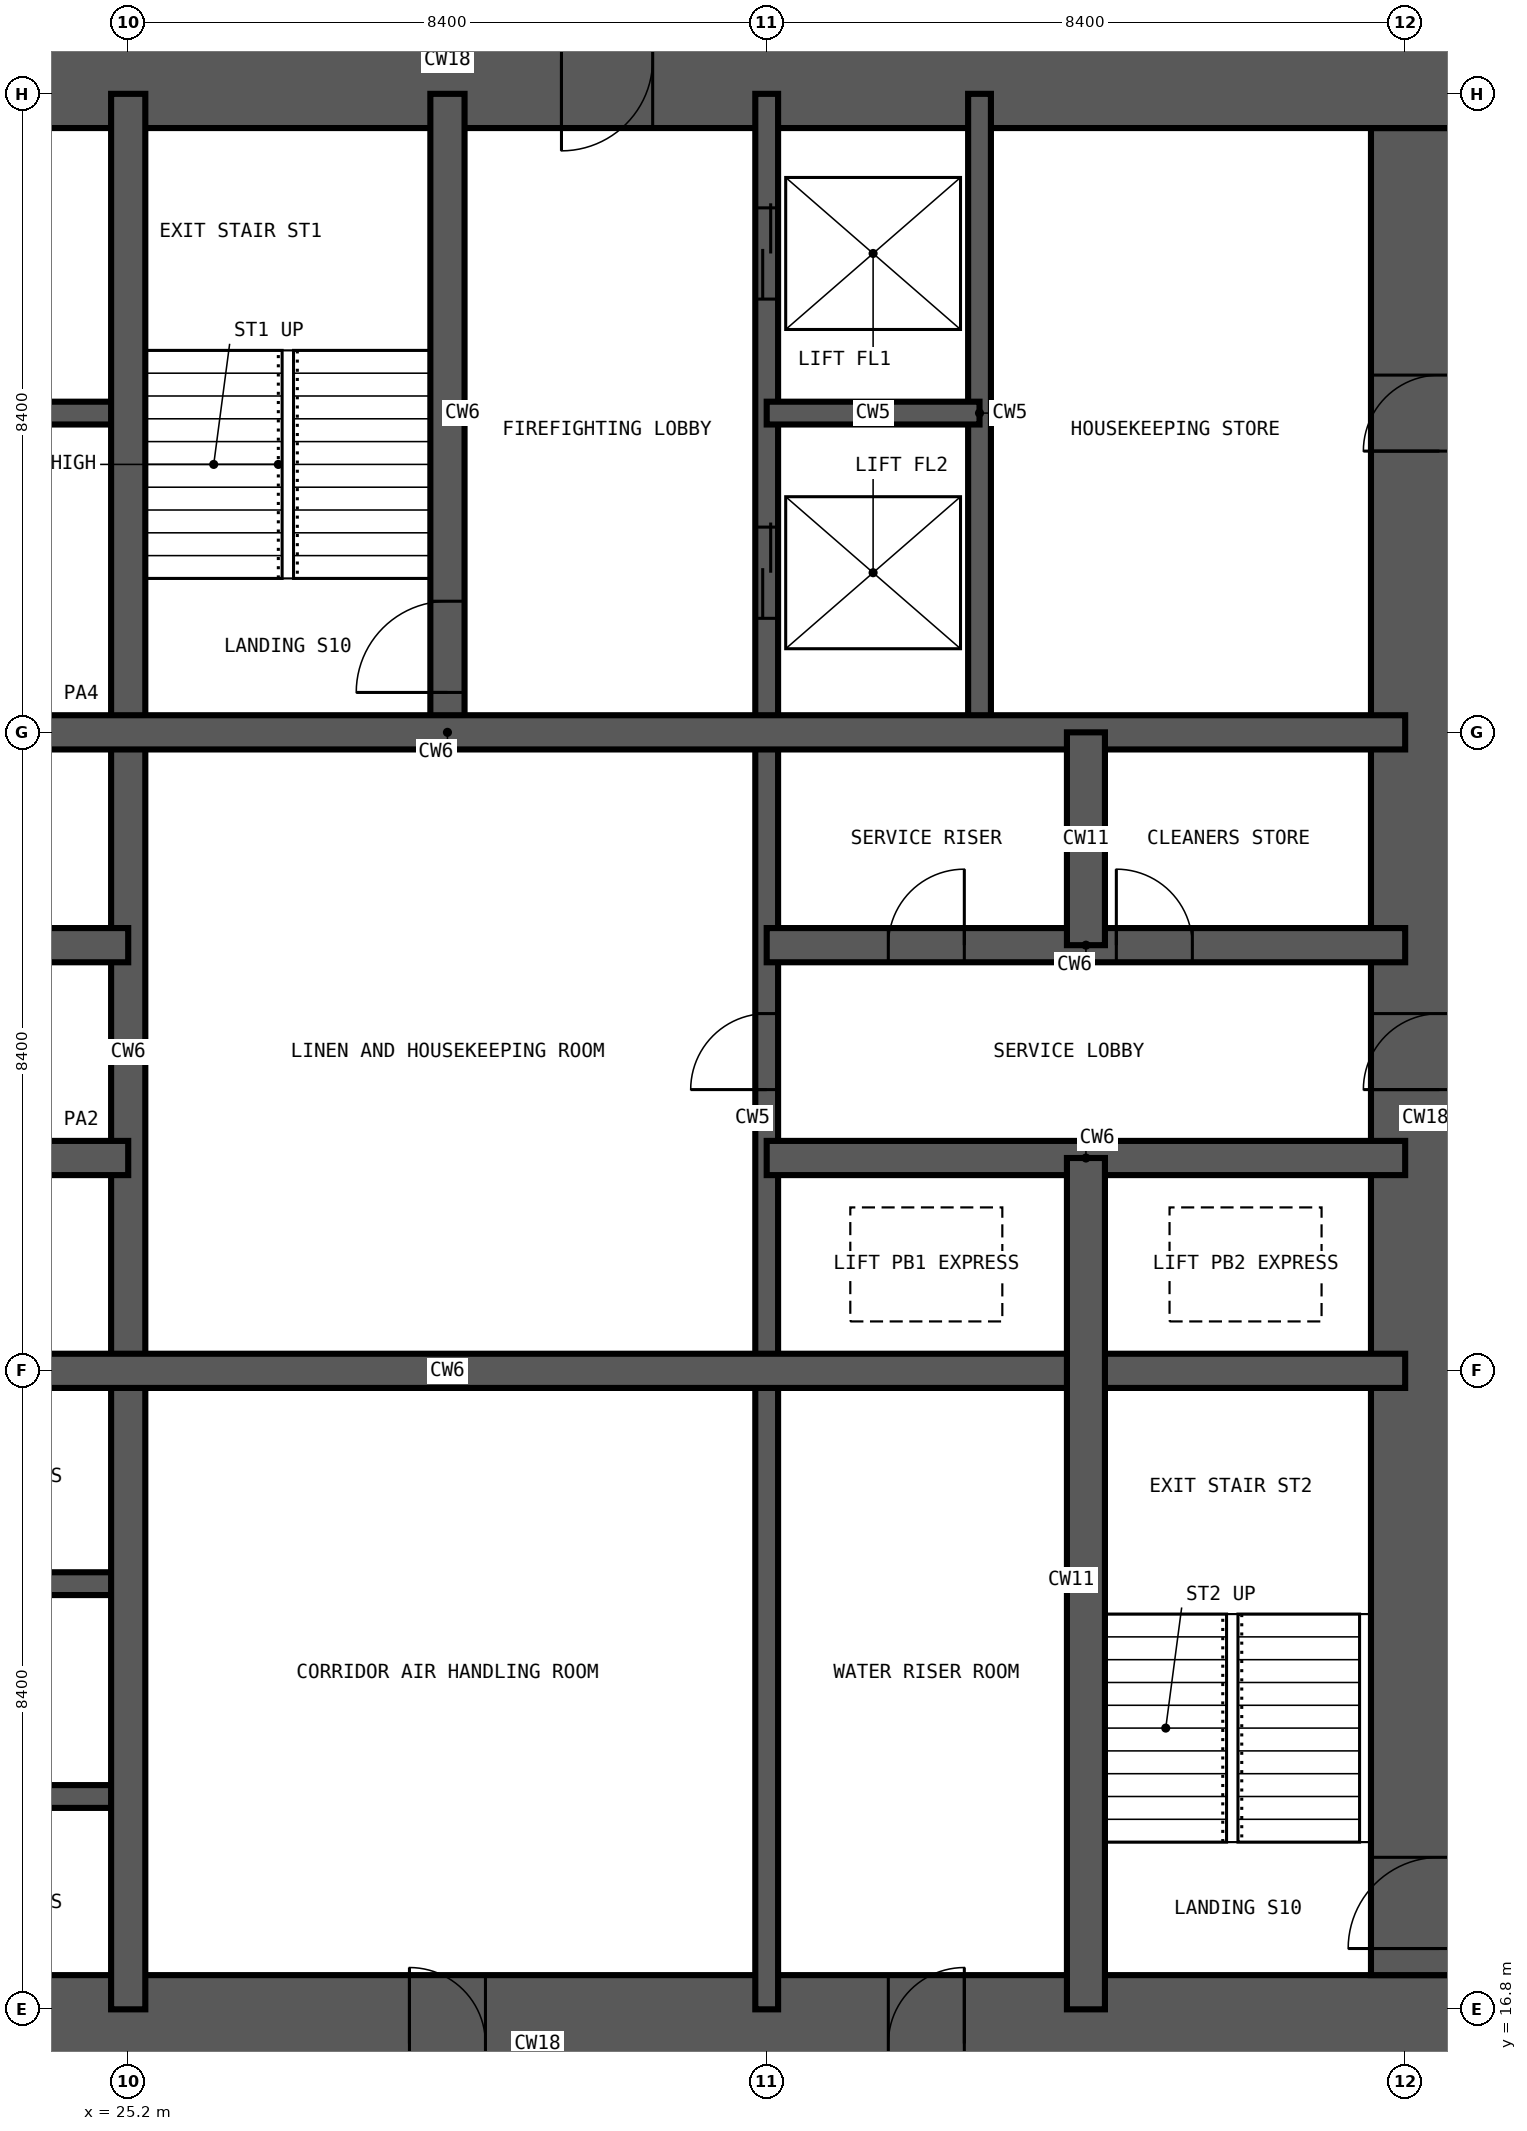
"""IFC4 building model, lengths in metres.
Left out: names, types, materials, properties, quantities, classifications, styles, units other than length and angle.
Written with IfcOpenShell. Run it as: python <this file> out.ifc"""

import sys

from ifc_helpers import new_model, si_unit, direction, frame, frame_2d, origin, place, context, subcontext, project, spatial, rectangle, extrude, element, fill, save


model = new_model("IFC4")
c1 = context("Model", 3, precision=1e-05, world=origin(), true_north=direction((0.0, 1.0)))
c2 = subcontext(c1, "Body", "Model", "MODEL_VIEW")
j1 = project(units=[si_unit("LENGTHUNIT", "METRE"), si_unit("PLANEANGLEUNIT", "RADIAN")], contexts=[c1])
p1 = place(None, origin())
s1 = spatial("IfcSite", under=j1, at=p1, CompositionType="ELEMENT")
p2 = place(p1, origin())
s2 = spatial("IfcBuilding", under=s1, at=p2, CompositionType="ELEMENT")
p3 = place(p2, frame((0.0, 0.0, 45.0)))
s3 = spatial("IfcBuildingStorey", under=s2, at=p3, CompositionType="ELEMENT", Elevation=45.0)
p4 = place(p3, frame((15.45, 16.35, -0.35), z_axis=(0.0, 0.0, 1.0), x_axis=(1.0, 0.0, 0.0)))
e1 = element("IfcWall", 1, at=p4, inside=s3, PredefinedType="SHEAR", context=c2, shape_type="SweptSolid", body=[
    extrude(rectangle(XDim=27.9, YDim=1.8, at=frame_2d((13.95, 0.0))), origin(), (0.0, 0.0, 1.0), 3.6),
])
p5 = place(p4, frame((13.45, 0.0, 0.35)))
e2 = element("IfcOpeningElement", 2, at=p5, cuts=e1, PredefinedType="OPENING", context=c2, shape_type="SweptSolid", body=[
    extrude(rectangle(XDim=1.0, YDim=2.1, at=frame_2d((0.5, 1.05))), frame((0.0, 0.91, 0.0), z_axis=(0.0, -1.0, 0.0), x_axis=(1.0, 0.0, 0.0)), (0.0, 0.0, 1.0), 1.82),
])
p6 = place(p4, frame((19.75, 0.0, 0.35)))
e3 = element("IfcOpeningElement", 3, at=p6, cuts=e1, PredefinedType="OPENING", context=c2, shape_type="SweptSolid", body=[
    extrude(rectangle(XDim=1.0, YDim=2.1, at=frame_2d((0.5, 1.05))), frame((0.0, 0.91, 0.0), z_axis=(0.0, -1.0, 0.0), x_axis=(1.0, 0.0, 0.0)), (0.0, 0.0, 1.0), 1.82),
])
p7 = place(p3, frame((42.45, 17.25, -0.35), z_axis=(0.0, 0.0, 1.0), x_axis=(0.0, 1.0, 0.0)))
e4 = element("IfcWall", 4, at=p7, inside=s3, PredefinedType="SHEAR", context=c2, shape_type="SweptSolid", body=[
    extrude(rectangle(XDim=24.3, YDim=1.8, at=frame_2d((12.15, 0.0))), origin(), (0.0, 0.0, 1.0), 3.6),
])
p8 = place(p7, frame((0.35, 0.0, 0.35)))
e5 = element("IfcOpeningElement", 5, at=p8, cuts=e4, PredefinedType="OPENING", context=c2, shape_type="SweptSolid", body=[
    extrude(rectangle(XDim=1.2, YDim=2.2, at=frame_2d((0.6, 1.1))), frame((0.0, 0.91, 0.0), z_axis=(0.0, -1.0, 0.0), x_axis=(1.0, 0.0, 0.0)), (0.0, 0.0, 1.0), 1.82),
])
p9 = place(p7, frame((11.65, 0.0, 0.35)))
e6 = element("IfcOpeningElement", 6, at=p9, cuts=e4, PredefinedType="OPENING", context=c2, shape_type="SweptSolid", body=[
    extrude(rectangle(XDim=1.0, YDim=2.1, at=frame_2d((0.5, 1.05))), frame((0.0, 0.91, 0.0), z_axis=(0.0, -1.0, 0.0), x_axis=(1.0, 0.0, 0.0)), (0.0, 0.0, 1.0), 1.82),
])
p10 = place(p7, frame((20.05, 0.0, 0.35)))
e7 = element("IfcOpeningElement", 7, at=p10, cuts=e4, PredefinedType="OPENING", context=c2, shape_type="SweptSolid", body=[
    extrude(rectangle(XDim=1.0, YDim=2.1, at=frame_2d((0.5, 1.05))), frame((0.0, 0.91, 0.0), z_axis=(0.0, -1.0, 0.0), x_axis=(1.0, 0.0, 0.0)), (0.0, 0.0, 1.0), 1.82),
])
p11 = place(p3, frame((43.35, 42.45, -0.35), z_axis=(0.0, 0.0, 1.0), x_axis=(-1.0, 0.0, 0.0)))
e8 = element("IfcWall", 8, at=p11, inside=s3, PredefinedType="SHEAR", context=c2, shape_type="SweptSolid", body=[
    extrude(rectangle(XDim=27.9, YDim=1.8, at=frame_2d((13.95, 0.0))), origin(), (0.0, 0.0, 1.0), 3.6),
])
p12 = place(p11, frame((21.85, 0.0, 0.35)))
e9 = element("IfcOpeningElement", 9, at=p12, cuts=e8, PredefinedType="OPENING", context=c2, shape_type="SweptSolid", body=[
    extrude(rectangle(XDim=1.0, YDim=2.1, at=frame_2d((0.5, 1.05))), frame((0.0, 0.91, 0.0), z_axis=(0.0, -1.0, 0.0), x_axis=(1.0, 0.0, 0.0)), (0.0, 0.0, 1.0), 1.82),
])
p13 = place(p11, frame((11.25, 0.0, 0.35)))
e10 = element("IfcOpeningElement", 10, at=p13, cuts=e8, PredefinedType="OPENING", context=c2, shape_type="SweptSolid", body=[
    extrude(rectangle(XDim=1.2, YDim=2.2, at=frame_2d((0.6, 1.1))), frame((0.0, 0.91, 0.0), z_axis=(0.0, -1.0, 0.0), x_axis=(1.0, 0.0, 0.0)), (0.0, 0.0, 1.0), 1.82),
])
p14 = place(p3, frame((33.6, 16.8, -0.35), z_axis=(0.0, 0.0, 1.0), x_axis=(0.0, 1.0, 0.0)))
e11 = element("IfcWall", 11, at=p14, inside=s3, PredefinedType="SHEAR", context=c2, shape_type="SweptSolid", body=[
    extrude(rectangle(XDim=25.2, YDim=0.3, at=frame_2d((12.6, 0.0))), origin(), (0.0, 0.0, 1.0), 3.6),
])
p15 = place(p14, frame((22.5, 0.0, 0.35)))
e12 = element("IfcOpeningElement", 12, at=p15, cuts=e11, PredefinedType="OPENING", context=c2, shape_type="SweptSolid", body=[
    extrude(rectangle(XDim=1.2, YDim=2.2, at=frame_2d((0.6, 1.1))), frame((0.0, 0.16, 0.0), z_axis=(0.0, -1.0, 0.0), x_axis=(1.0, 0.0, 0.0)), (0.0, 0.0, 1.0), 0.32),
])
p16 = place(p14, frame((18.3, 0.0, 0.35)))
e13 = element("IfcOpeningElement", 13, at=p16, cuts=e11, PredefinedType="OPENING", context=c2, shape_type="SweptSolid", body=[
    extrude(rectangle(XDim=1.2, YDim=2.2, at=frame_2d((0.6, 1.1))), frame((0.0, 0.16, 0.0), z_axis=(0.0, -1.0, 0.0), x_axis=(1.0, 0.0, 0.0)), (0.0, 0.0, 1.0), 0.32),
])
p17 = place(p14, frame((12.1, 0.0, 0.35)))
e14 = element("IfcOpeningElement", 14, at=p17, cuts=e11, PredefinedType="OPENING", context=c2, shape_type="SweptSolid", body=[
    extrude(rectangle(XDim=1.0, YDim=2.1, at=frame_2d((0.5, 1.05))), frame((0.0, 0.16, 0.0), z_axis=(0.0, -1.0, 0.0), x_axis=(1.0, 0.0, 0.0)), (0.0, 0.0, 1.0), 0.32),
])
for number, where, z_axis, x_axis in (
    (15, (36.4, 33.6, -0.35), (0.0, 0.0, 1.0), (0.0, 1.0, 0.0)),
    (16, (16.8, 19.6, -0.35), (0.0, 0.0, 1.0), (1.0, 0.0, 0.0)),
    (17, (16.8, 22.4, -0.35), (0.0, 0.0, 1.0), (1.0, 0.0, 0.0)),
    (18, (16.8, 37.8, -0.35), (0.0, 0.0, 1.0), (1.0, 0.0, 0.0)),
):
    element("IfcWall", number, at=place(p3, frame(where, z_axis=z_axis, x_axis=x_axis)), inside=s3, PredefinedType="SHEAR", context=c2, shape_type="SweptSolid", body=[
        extrude(rectangle(XDim=8.4, YDim=0.3, at=frame_2d((4.2, 0.0))), origin(), (0.0, 0.0, 1.0), 3.6),
    ])
p18 = place(p3, frame((33.6, 37.8, -0.35), z_axis=(0.0, 0.0, 1.0), x_axis=(1.0, 0.0, 0.0)))
e19 = element("IfcWall", 19, at=p18, inside=s3, PredefinedType="SHEAR", context=c2, shape_type="SweptSolid", body=[
    extrude(rectangle(XDim=2.8, YDim=0.3, at=frame_2d((1.4, 0.0))), origin(), (0.0, 0.0, 1.0), 3.6),
])
p19 = place(p3, frame((25.2, 16.8, -0.35), z_axis=(0.0, 0.0, 1.0), x_axis=(0.0, 1.0, 0.0)))
e20 = element("IfcWall", 20, at=p19, inside=s3, PredefinedType="SHEAR", context=c2, shape_type="SweptSolid", body=[
    extrude(rectangle(XDim=25.2, YDim=0.45, at=frame_2d((12.6, 0.0))), origin(), (0.0, 0.0, 1.0), 3.6),
])
p20 = place(p3, frame((29.4, 33.6, -0.35), z_axis=(0.0, 0.0, 1.0), x_axis=(0.0, 1.0, 0.0)))
e21 = element("IfcWall", 21, at=p20, inside=s3, PredefinedType="SHEAR", context=c2, shape_type="SweptSolid", body=[
    extrude(rectangle(XDim=8.4, YDim=0.45, at=frame_2d((4.2, 0.0))), origin(), (0.0, 0.0, 1.0), 3.6),
])
p21 = place(p20, frame((0.525, 0.0, 0.35)))
e22 = element("IfcOpeningElement", 22, at=p21, cuts=e21, PredefinedType="OPENING", context=c2, shape_type="SweptSolid", body=[
    extrude(rectangle(XDim=1.2, YDim=2.2, at=frame_2d((0.6, 1.1))), frame((0.0, 0.235, 0.0), z_axis=(0.0, -1.0, 0.0), x_axis=(1.0, 0.0, 0.0)), (0.0, 0.0, 1.0), 0.47),
])
p22 = place(p3, frame((16.8, 25.2, -0.35), z_axis=(0.0, 0.0, 1.0), x_axis=(1.0, 0.0, 0.0)))
e23 = element("IfcWall", 23, at=p22, inside=s3, PredefinedType="SHEAR", context=c2, shape_type="SweptSolid", body=[
    extrude(rectangle(XDim=25.2, YDim=0.45, at=frame_2d((12.6, 0.0))), origin(), (0.0, 0.0, 1.0), 3.6),
])
p23 = place(p3, frame((16.8, 28.0, -0.35), z_axis=(0.0, 0.0, 1.0), x_axis=(1.0, 0.0, 0.0)))
e24 = element("IfcWall", 24, at=p23, inside=s3, PredefinedType="SHEAR", context=c2, shape_type="SweptSolid", body=[
    extrude(rectangle(XDim=8.4, YDim=0.45, at=frame_2d((4.2, 0.0))), origin(), (0.0, 0.0, 1.0), 3.6),
])
p24 = place(p23, frame((1.55, 0.0, 0.35)))
e25 = element("IfcOpeningElement", 25, at=p24, cuts=e24, PredefinedType="OPENING", context=c2, shape_type="SweptSolid", body=[
    extrude(rectangle(XDim=1.1, YDim=2.2, at=frame_2d((0.55, 1.1))), frame((0.0, 0.235, 0.0), z_axis=(0.0, -1.0, 0.0), x_axis=(1.0, 0.0, 0.0)), (0.0, 0.0, 1.0), 0.47),
])
p25 = place(p23, frame((5.75, 0.0, 0.35)))
e26 = element("IfcOpeningElement", 26, at=p25, cuts=e24, PredefinedType="OPENING", context=c2, shape_type="SweptSolid", body=[
    extrude(rectangle(XDim=1.1, YDim=2.2, at=frame_2d((0.55, 1.1))), frame((0.0, 0.235, 0.0), z_axis=(0.0, -1.0, 0.0), x_axis=(1.0, 0.0, 0.0)), (0.0, 0.0, 1.0), 0.47),
])
p26 = place(p3, frame((33.6, 28.0, -0.35), z_axis=(0.0, 0.0, 1.0), x_axis=(1.0, 0.0, 0.0)))
e27 = element("IfcWall", 27, at=p26, inside=s3, PredefinedType="SHEAR", context=c2, shape_type="SweptSolid", body=[
    extrude(rectangle(XDim=8.4, YDim=0.45, at=frame_2d((4.2, 0.0))), origin(), (0.0, 0.0, 1.0), 3.6),
])
p27 = place(p3, frame((16.8, 30.8, -0.35), z_axis=(0.0, 0.0, 1.0), x_axis=(1.0, 0.0, 0.0)))
e28 = element("IfcWall", 28, at=p27, inside=s3, PredefinedType="SHEAR", context=c2, shape_type="SweptSolid", body=[
    extrude(rectangle(XDim=8.4, YDim=0.45, at=frame_2d((4.2, 0.0))), origin(), (0.0, 0.0, 1.0), 3.6),
])
p28 = place(p27, frame((1.55, 0.0, 0.35)))
e29 = element("IfcOpeningElement", 29, at=p28, cuts=e28, PredefinedType="OPENING", context=c2, shape_type="SweptSolid", body=[
    extrude(rectangle(XDim=1.1, YDim=2.2, at=frame_2d((0.55, 1.1))), frame((0.0, 0.235, 0.0), z_axis=(0.0, -1.0, 0.0), x_axis=(1.0, 0.0, 0.0)), (0.0, 0.0, 1.0), 0.47),
])
p29 = place(p27, frame((5.75, 0.0, 0.35)))
e30 = element("IfcOpeningElement", 30, at=p29, cuts=e28, PredefinedType="OPENING", context=c2, shape_type="SweptSolid", body=[
    extrude(rectangle(XDim=1.1, YDim=2.2, at=frame_2d((0.55, 1.1))), frame((0.0, 0.235, 0.0), z_axis=(0.0, -1.0, 0.0), x_axis=(1.0, 0.0, 0.0)), (0.0, 0.0, 1.0), 0.47),
])
p30 = place(p3, frame((33.6, 30.8, -0.35), z_axis=(0.0, 0.0, 1.0), x_axis=(1.0, 0.0, 0.0)))
e31 = element("IfcWall", 31, at=p30, inside=s3, PredefinedType="SHEAR", context=c2, shape_type="SweptSolid", body=[
    extrude(rectangle(XDim=8.4, YDim=0.45, at=frame_2d((4.2, 0.0))), origin(), (0.0, 0.0, 1.0), 3.6),
])
p31 = place(p30, frame((1.6, 0.0, 0.35)))
e32 = element("IfcOpeningElement", 32, at=p31, cuts=e31, PredefinedType="OPENING", context=c2, shape_type="SweptSolid", body=[
    extrude(rectangle(XDim=1.0, YDim=2.1, at=frame_2d((0.5, 1.05))), frame((0.0, 0.235, 0.0), z_axis=(0.0, -1.0, 0.0), x_axis=(1.0, 0.0, 0.0)), (0.0, 0.0, 1.0), 0.47),
])
p32 = place(p30, frame((4.6, 0.0, 0.35)))
e33 = element("IfcOpeningElement", 33, at=p32, cuts=e31, PredefinedType="OPENING", context=c2, shape_type="SweptSolid", body=[
    extrude(rectangle(XDim=1.0, YDim=2.1, at=frame_2d((0.5, 1.05))), frame((0.0, 0.235, 0.0), z_axis=(0.0, -1.0, 0.0), x_axis=(1.0, 0.0, 0.0)), (0.0, 0.0, 1.0), 0.47),
])
p33 = place(p3, frame((16.8, 33.6, -0.35), z_axis=(0.0, 0.0, 1.0), x_axis=(1.0, 0.0, 0.0)))
e34 = element("IfcWall", 34, at=p33, inside=s3, PredefinedType="SHEAR", context=c2, shape_type="SweptSolid", body=[
    extrude(rectangle(XDim=25.2, YDim=0.45, at=frame_2d((12.6, 0.0))), origin(), (0.0, 0.0, 1.0), 3.6),
])
p34 = place(p3, frame((37.8, 16.8, -0.35), z_axis=(0.0, 0.0, 1.0), x_axis=(0.0, 1.0, 0.0)))
e35 = element("IfcWall", 35, at=p34, inside=s3, PredefinedType="SHEAR", context=c2, shape_type="SweptSolid", body=[
    extrude(rectangle(XDim=11.2, YDim=0.5, at=frame_2d((5.6, 0.0))), origin(), (0.0, 0.0, 1.0), 3.6),
])
p35 = place(p3, frame((37.8, 30.8, -0.35), z_axis=(0.0, 0.0, 1.0), x_axis=(0.0, 1.0, 0.0)))
e36 = element("IfcWall", 36, at=p35, inside=s3, PredefinedType="SHEAR", context=c2, shape_type="SweptSolid", body=[
    extrude(rectangle(XDim=2.8, YDim=0.5, at=frame_2d((1.4, 0.0))), origin(), (0.0, 0.0, 1.0), 3.6),
])
p36 = place(p21, origin())
e37 = element("IfcDoor", 37, at=p36, inside=s3, OperationType="SINGLE_SWING_LEFT", PredefinedType="DOOR", context=c2, shape_type="SweptSolid", body=[
    extrude(rectangle(XDim=1.2, YDim=2.2, at=frame_2d((0.6, 1.1))), frame((0.0, 0.025, 0.0), z_axis=(0.0, -1.0, 0.0), x_axis=(1.0, 0.0, 0.0)), (0.0, 0.0, 1.0), 0.05),
])
fill(e22, e37)
p37 = place(p8, origin())
e38 = element("IfcDoor", 38, at=p37, inside=s3, OperationType="SINGLE_SWING_LEFT", PredefinedType="DOOR", context=c2, shape_type="SweptSolid", body=[
    extrude(rectangle(XDim=1.2, YDim=2.2, at=frame_2d((0.6, 1.1))), frame((0.0, 0.025, 0.0), z_axis=(0.0, -1.0, 0.0), x_axis=(1.0, 0.0, 0.0)), (0.0, 0.0, 1.0), 0.05),
])
fill(e5, e38)
p38 = place(p15, origin())
e39 = element("IfcDoor", 39, at=p38, inside=s3, OperationType="DOUBLE_DOOR_SLIDING", PredefinedType="DOOR", context=c2, shape_type="SweptSolid", body=[
    extrude(rectangle(XDim=1.2, YDim=2.2, at=frame_2d((0.6, 1.1))), frame((0.0, 0.025, 0.0), z_axis=(0.0, -1.0, 0.0), x_axis=(1.0, 0.0, 0.0)), (0.0, 0.0, 1.0), 0.05),
])
fill(e12, e39)
p39 = place(p16, origin())
e40 = element("IfcDoor", 40, at=p39, inside=s3, OperationType="DOUBLE_DOOR_SLIDING", PredefinedType="DOOR", context=c2, shape_type="SweptSolid", body=[
    extrude(rectangle(XDim=1.2, YDim=2.2, at=frame_2d((0.6, 1.1))), frame((0.0, 0.025, 0.0), z_axis=(0.0, -1.0, 0.0), x_axis=(1.0, 0.0, 0.0)), (0.0, 0.0, 1.0), 0.05),
])
fill(e13, e40)
p40 = place(p17, origin())
e41 = element("IfcDoor", 41, at=p40, inside=s3, OperationType="SINGLE_SWING_LEFT", PredefinedType="DOOR", context=c2, shape_type="SweptSolid", body=[
    extrude(rectangle(XDim=1.0, YDim=2.1, at=frame_2d((0.5, 1.05))), frame((0.0, 0.025, 0.0), z_axis=(0.0, -1.0, 0.0), x_axis=(1.0, 0.0, 0.0)), (0.0, 0.0, 1.0), 0.05),
])
fill(e14, e41)
p41 = place(p31, origin())
e42 = element("IfcDoor", 42, at=p41, inside=s3, OperationType="SINGLE_SWING_RIGHT", PredefinedType="DOOR", context=c2, shape_type="SweptSolid", body=[
    extrude(rectangle(XDim=1.0, YDim=2.1, at=frame_2d((0.5, 1.05))), frame((0.0, 0.025, 0.0), z_axis=(0.0, -1.0, 0.0), x_axis=(1.0, 0.0, 0.0)), (0.0, 0.0, 1.0), 0.05),
])
fill(e32, e42)
p42 = place(p32, origin())
e43 = element("IfcDoor", 43, at=p42, inside=s3, OperationType="SINGLE_SWING_LEFT", PredefinedType="DOOR", context=c2, shape_type="SweptSolid", body=[
    extrude(rectangle(XDim=1.0, YDim=2.1, at=frame_2d((0.5, 1.05))), frame((0.0, 0.025, 0.0), z_axis=(0.0, -1.0, 0.0), x_axis=(1.0, 0.0, 0.0)), (0.0, 0.0, 1.0), 0.05),
])
fill(e33, e43)
p43 = place(p9, origin())
e44 = element("IfcDoor", 44, at=p43, inside=s3, OperationType="SINGLE_SWING_LEFT", PredefinedType="DOOR", context=c2, shape_type="SweptSolid", body=[
    extrude(rectangle(XDim=1.0, YDim=2.1, at=frame_2d((0.5, 1.05))), frame((0.0, 0.025, 0.0), z_axis=(0.0, -1.0, 0.0), x_axis=(1.0, 0.0, 0.0)), (0.0, 0.0, 1.0), 0.05),
])
fill(e6, e44)
p44 = place(p13, origin())
e45 = element("IfcDoor", 45, at=p44, inside=s3, OperationType="SINGLE_SWING_RIGHT", PredefinedType="DOOR", context=c2, shape_type="SweptSolid", body=[
    extrude(rectangle(XDim=1.2, YDim=2.2, at=frame_2d((0.6, 1.1))), frame((0.0, 0.025, 0.0), z_axis=(0.0, -1.0, 0.0), x_axis=(1.0, 0.0, 0.0)), (0.0, 0.0, 1.0), 0.05),
])
fill(e10, e45)
p45 = place(p10, origin())
e46 = element("IfcDoor", 46, at=p45, inside=s3, OperationType="SINGLE_SWING_LEFT", PredefinedType="DOOR", context=c2, shape_type="SweptSolid", body=[
    extrude(rectangle(XDim=1.0, YDim=2.1, at=frame_2d((0.5, 1.05))), frame((0.0, 0.025, 0.0), z_axis=(0.0, -1.0, 0.0), x_axis=(1.0, 0.0, 0.0)), (0.0, 0.0, 1.0), 0.05),
])
fill(e7, e46)
p46 = place(p5, origin())
e47 = element("IfcDoor", 47, at=p46, inside=s3, OperationType="SINGLE_SWING_LEFT", PredefinedType="DOOR", context=c2, shape_type="SweptSolid", body=[
    extrude(rectangle(XDim=1.0, YDim=2.1, at=frame_2d((0.5, 1.05))), frame((0.0, 0.025, 0.0), z_axis=(0.0, -1.0, 0.0), x_axis=(1.0, 0.0, 0.0)), (0.0, 0.0, 1.0), 0.05),
])
fill(e2, e47)
p47 = place(p6, origin())
e48 = element("IfcDoor", 48, at=p47, inside=s3, OperationType="SINGLE_SWING_RIGHT", PredefinedType="DOOR", context=c2, shape_type="SweptSolid", body=[
    extrude(rectangle(XDim=1.0, YDim=2.1, at=frame_2d((0.5, 1.05))), frame((0.0, 0.025, 0.0), z_axis=(0.0, -1.0, 0.0), x_axis=(1.0, 0.0, 0.0)), (0.0, 0.0, 1.0), 0.05),
])
fill(e3, e48)
save(model, sys.argv[1])
